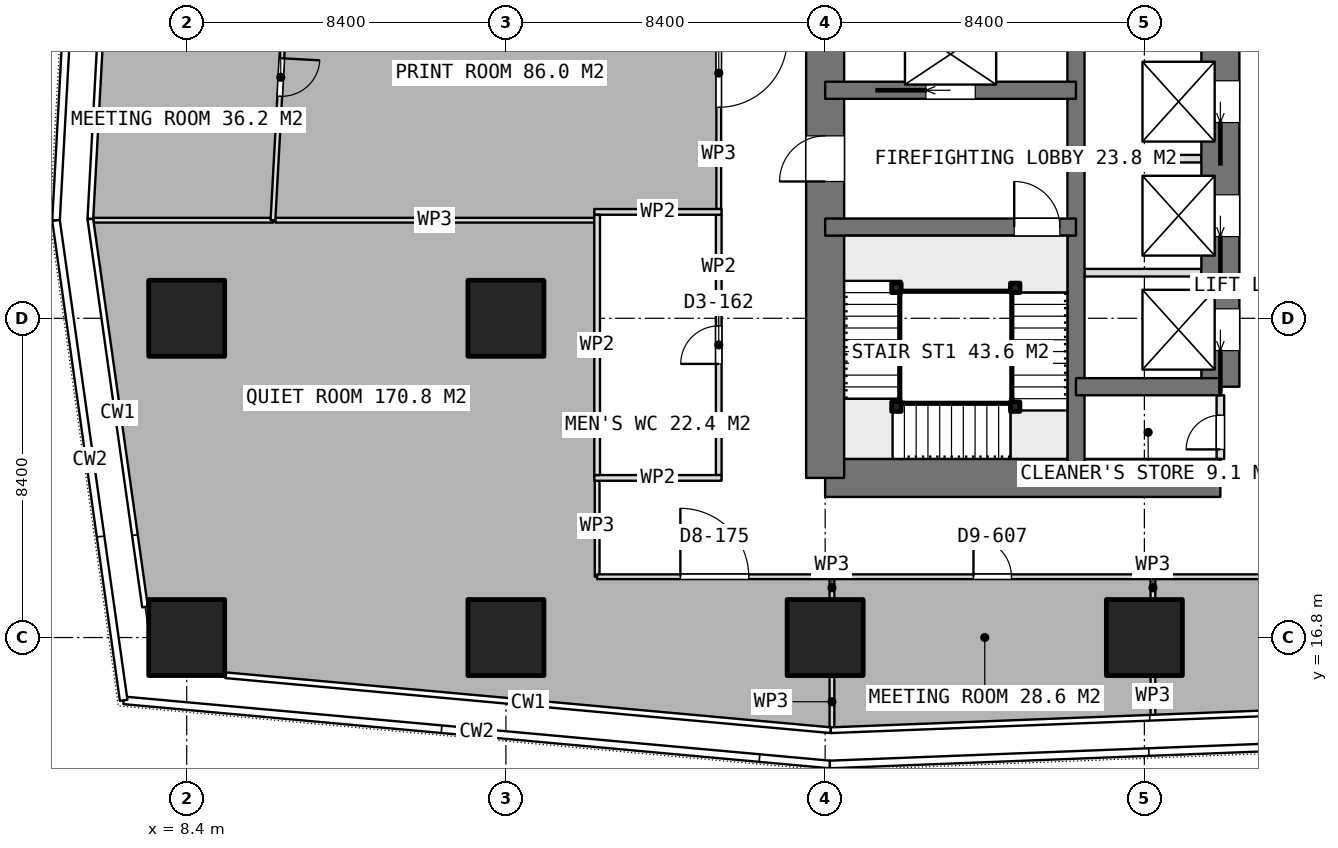
"""IFC4 building model, lengths in metres.
Left out: names, types, materials, properties, quantities, classifications, styles, units other than length and angle.
Written with IfcOpenShell. Run it as: python <this file> out.ifc"""

import sys

from ifc_helpers import new_model, si_unit, direction, frame, frame_2d, origin, origin_2d, place, context, subcontext, project, spatial, rectangle, extrude, element, fill, save


model = new_model("IFC4")
c1 = context("Model", 3, precision=1e-05, world=origin(), true_north=direction((0.0, 1.0)))
c2 = subcontext(c1, "Body", "Model", "MODEL_VIEW")
j1 = project(units=[si_unit("LENGTHUNIT", "METRE"), si_unit("PLANEANGLEUNIT", "RADIAN")], contexts=[c1])
p1 = place(None, origin())
s1 = spatial("IfcSite", under=j1, at=p1, CompositionType="ELEMENT")
p2 = place(p1, origin())
s2 = spatial("IfcBuilding", under=s1, at=p2, CompositionType="ELEMENT")
p3 = place(p2, frame((0.0, 0.0, 151.55)))
s3 = spatial("IfcBuildingStorey", under=s2, at=p3, CompositionType="ELEMENT", Elevation=151.55)
p4 = place(p3, frame((25.2, 21.0, 0.0), z_axis=(0.0, 0.0, 1.0), x_axis=(1.0, 0.0, 0.0)))
e1 = element("IfcWall", 1, at=p4, inside=s3, PredefinedType="SHEAR", context=c2, shape_type="SweptSolid", body=[
    extrude(rectangle(XDim=10.4, YDim=1.0, at=frame_2d((5.2, 0.0))), origin(), (0.0, 0.0, 1.0), 3.75),
])
p5 = place(p3, frame((25.2, 21.0, 0.0), z_axis=(0.0, 0.0, 1.0), x_axis=(0.0, 1.0, 0.0)))
e2 = element("IfcWall", 2, at=p5, inside=s3, PredefinedType="SHEAR", context=c2, shape_type="SweptSolid", body=[
    extrude(rectangle(XDim=25.2, YDim=1.0, at=frame_2d((12.6, 0.0))), origin(), (0.0, 0.0, 1.0), 3.75),
])
p6 = place(p5, frame((7.8, 0.0, 0.0)))
e3 = element("IfcOpeningElement", 3, at=p6, cuts=e2, PredefinedType="OPENING", context=c2, shape_type="SweptSolid", body=[
    extrude(rectangle(XDim=1.2, YDim=2.1, at=frame_2d((0.6, 1.05))), frame((0.0, 0.51, 0.0), z_axis=(0.0, -1.0, 0.0), x_axis=(1.0, 0.0, 0.0)), (0.0, 0.0, 1.0), 1.02),
])
p7 = place(p5, frame((14.25, 0.0, 0.0)))
e4 = element("IfcOpeningElement", 4, at=p7, cuts=e2, PredefinedType="OPENING", context=c2, shape_type="SweptSolid", body=[
    extrude(rectangle(XDim=0.9, YDim=2.1, at=frame_2d((0.45, 1.05))), frame((0.0, 0.51, 0.0), z_axis=(0.0, -1.0, 0.0), x_axis=(1.0, 0.0, 0.0)), (0.0, 0.0, 1.0), 1.02),
])
p8 = place(p5, frame((16.85, 0.0, 0.0)))
e5 = element("IfcOpeningElement", 5, at=p8, cuts=e2, PredefinedType="OPENING", context=c2, shape_type="SweptSolid", body=[
    extrude(rectangle(XDim=0.9, YDim=2.1, at=frame_2d((0.45, 1.05))), frame((0.0, 0.51, 0.0), z_axis=(0.0, -1.0, 0.0), x_axis=(1.0, 0.0, 0.0)), (0.0, 0.0, 1.0), 1.02),
])
p9 = place(p5, frame((19.025, 0.0, 0.0)))
e6 = element("IfcOpeningElement", 6, at=p9, cuts=e2, PredefinedType="OPENING", context=c2, shape_type="SweptSolid", body=[
    extrude(rectangle(XDim=1.2, YDim=2.1, at=frame_2d((0.6, 1.05))), frame((0.0, 0.51, 0.0), z_axis=(0.0, -1.0, 0.0), x_axis=(1.0, 0.0, 0.0)), (0.0, 0.0, 1.0), 1.02),
])
p10 = place(p3, frame((31.8, 21.0, 0.0), z_axis=(0.0, 0.0, 1.0), x_axis=(0.0, 1.0, 0.0)))
e7 = element("IfcWall", 7, at=p10, inside=s3, PredefinedType="SHEAR", context=c2, shape_type="SweptSolid", body=[
    extrude(rectangle(XDim=25.2, YDim=0.45, at=frame_2d((12.6, 0.0))), origin(), (0.0, 0.0, 1.0), 3.75),
])
p11 = place(p3, frame((35.6, 23.4, 0.0), z_axis=(0.0, 0.0, 1.0), x_axis=(0.0, 1.0, 0.0)))
e8 = element("IfcWall", 8, at=p11, inside=s3, PredefinedType="SHEAR", context=c2, shape_type="SweptSolid", body=[
    extrude(rectangle(XDim=18.0, YDim=1.0, at=frame_2d((9.0, 0.0))), origin(), (0.0, 0.0, 1.0), 3.75),
])
p12 = place(p11, frame((0.95, 0.0, 0.0)))
e9 = element("IfcOpeningElement", 9, at=p12, cuts=e8, PredefinedType="OPENING", context=c2, shape_type="SweptSolid", body=[
    extrude(rectangle(XDim=1.1, YDim=2.1, at=frame_2d((0.55, 1.05))), frame((0.0, 0.51, 0.0), z_axis=(0.0, -1.0, 0.0), x_axis=(1.0, 0.0, 0.0)), (0.0, 0.0, 1.0), 1.02),
])
p13 = place(p11, frame((3.95, 0.0, 0.0)))
e10 = element("IfcOpeningElement", 10, at=p13, cuts=e8, PredefinedType="OPENING", context=c2, shape_type="SweptSolid", body=[
    extrude(rectangle(XDim=1.1, YDim=2.1, at=frame_2d((0.55, 1.05))), frame((0.0, 0.51, 0.0), z_axis=(0.0, -1.0, 0.0), x_axis=(1.0, 0.0, 0.0)), (0.0, 0.0, 1.0), 1.02),
])
p14 = place(p11, frame((6.95, 0.0, 0.0)))
e11 = element("IfcOpeningElement", 11, at=p14, cuts=e8, PredefinedType="OPENING", context=c2, shape_type="SweptSolid", body=[
    extrude(rectangle(XDim=1.1, YDim=2.1, at=frame_2d((0.55, 1.05))), frame((0.0, 0.51, 0.0), z_axis=(0.0, -1.0, 0.0), x_axis=(1.0, 0.0, 0.0)), (0.0, 0.0, 1.0), 1.02),
])
p15 = place(p11, frame((9.95, 0.0, 0.0)))
e12 = element("IfcOpeningElement", 12, at=p15, cuts=e8, PredefinedType="OPENING", context=c2, shape_type="SweptSolid", body=[
    extrude(rectangle(XDim=1.1, YDim=2.1, at=frame_2d((0.55, 1.05))), frame((0.0, 0.51, 0.0), z_axis=(0.0, -1.0, 0.0), x_axis=(1.0, 0.0, 0.0)), (0.0, 0.0, 1.0), 1.02),
])
p16 = place(p11, frame((12.95, 0.0, 0.0)))
e13 = element("IfcOpeningElement", 13, at=p16, cuts=e8, PredefinedType="OPENING", context=c2, shape_type="SweptSolid", body=[
    extrude(rectangle(XDim=1.1, YDim=2.1, at=frame_2d((0.55, 1.05))), frame((0.0, 0.51, 0.0), z_axis=(0.0, -1.0, 0.0), x_axis=(1.0, 0.0, 0.0)), (0.0, 0.0, 1.0), 1.02),
])
p17 = place(p11, frame((15.95, 0.0, 0.0)))
e14 = element("IfcOpeningElement", 14, at=p17, cuts=e8, PredefinedType="OPENING", context=c2, shape_type="SweptSolid", body=[
    extrude(rectangle(XDim=1.1, YDim=2.1, at=frame_2d((0.55, 1.05))), frame((0.0, 0.51, 0.0), z_axis=(0.0, -1.0, 0.0), x_axis=(1.0, 0.0, 0.0)), (0.0, 0.0, 1.0), 1.02),
])
p18 = place(p3, frame((31.8, 23.4, 0.0), z_axis=(0.0, 0.0, 1.0), x_axis=(1.0, 0.0, 0.0)))
e15 = element("IfcWall", 15, at=p18, inside=s3, PredefinedType="SHEAR", context=c2, shape_type="SweptSolid", body=[
    extrude(rectangle(XDim=3.8, YDim=0.45, at=frame_2d((1.9, 0.0))), origin(), (0.0, 0.0, 1.0), 3.75),
])
p19 = place(p3, frame((25.2, 27.6, 0.0), z_axis=(0.0, 0.0, 1.0), x_axis=(1.0, 0.0, 0.0)))
e16 = element("IfcWall", 16, at=p19, inside=s3, PredefinedType="SHEAR", context=c2, shape_type="SweptSolid", body=[
    extrude(rectangle(XDim=6.6, YDim=0.45, at=frame_2d((3.3, 0.0))), origin(), (0.0, 0.0, 1.0), 3.75),
])
p20 = place(p19, frame((4.975, 0.0, 0.0)))
e17 = element("IfcOpeningElement", 17, at=p20, cuts=e16, PredefinedType="OPENING", context=c2, shape_type="SweptSolid", body=[
    extrude(rectangle(XDim=1.2, YDim=2.1, at=frame_2d((0.6, 1.05))), frame((0.0, 0.235, 0.0), z_axis=(0.0, -1.0, 0.0), x_axis=(1.0, 0.0, 0.0)), (0.0, 0.0, 1.0), 0.47),
])
p21 = place(p3, frame((25.2, 31.2, 0.0), z_axis=(0.0, 0.0, 1.0), x_axis=(1.0, 0.0, 0.0)))
e18 = element("IfcWall", 18, at=p21, inside=s3, PredefinedType="SHEAR", context=c2, shape_type="SweptSolid", body=[
    extrude(rectangle(XDim=6.6, YDim=0.45, at=frame_2d((3.3, 0.0))), origin(), (0.0, 0.0, 1.0), 3.75),
])
p22 = place(p21, frame((2.65, 0.0, 0.0)))
e19 = element("IfcOpeningElement", 19, at=p22, cuts=e18, PredefinedType="OPENING", context=c2, shape_type="SweptSolid", body=[
    extrude(rectangle(XDim=1.3, YDim=2.1, at=frame_2d((0.65, 1.05))), frame((0.0, 0.235, 0.0), z_axis=(0.0, -1.0, 0.0), x_axis=(1.0, 0.0, 0.0)), (0.0, 0.0, 1.0), 0.47),
])
for number, where, z_axis, x_axis in (
    (20, (8.4, 16.8, 0.0), (0.0, 0.0, 1.0), (1.0, 0.0, 0.0)),
    (21, (8.4, 25.2, 0.0), (0.0, 0.0, 1.0), (1.0, 0.0, 0.0)),
    (22, (16.8, 16.8, 0.0), (0.0, 0.0, 1.0), (1.0, 0.0, 0.0)),
    (23, (16.8, 25.2, 0.0), (0.0, 0.0, 1.0), (1.0, 0.0, 0.0)),
    (24, (25.2, 16.8, 0.0), (0.0, 0.0, 1.0), (1.0, 0.0, 0.0)),
    (25, (33.6, 16.8, 0.0), (0.0, 0.0, 1.0), (1.0, 0.0, 0.0)),
):
    element("IfcColumn", number, at=place(p3, frame(where, z_axis=z_axis, x_axis=x_axis)), inside=s3, PredefinedType="COLUMN", context=c2, shape_type="SweptSolid", body=[
        extrude(rectangle(XDim=2.0, YDim=2.0, at=origin_2d()), origin(), (0.0, 0.0, 1.0), 3.75),
    ])
for number, where, z_axis, x_axis in (
    (26, (32.025, 26.4, 0.0), (0.0, 0.0, 1.0), (1.0, 0.0, 0.0)),
    (27, (32.025, 29.4, 0.0), (0.0, 0.0, 1.0), (1.0, 0.0, 0.0)),
):
    element("IfcWall", number, at=place(p3, frame(where, z_axis=z_axis, x_axis=x_axis)), inside=s3, PredefinedType="PARTITIONING", context=c2, shape_type="SweptSolid", body=[
        extrude(rectangle(XDim=3.075, YDim=0.2, at=frame_2d((1.538, 0.0))), origin(), (0.0, 0.0, 1.0), 3.5),
    ])
p23 = place(p3, frame((35.6, 21.5, 0.0), z_axis=(0.0, 0.0, 1.0), x_axis=(0.0, 1.0, 0.0)))
e28 = element("IfcWall", 28, at=p23, inside=s3, PredefinedType="PARTITIONING", context=c2, shape_type="SweptSolid", body=[
    extrude(rectangle(XDim=1.675, YDim=0.2, at=frame_2d((0.837, 0.0))), origin(), (0.0, 0.0, 1.0), 3.5),
])
p24 = place(p23, frame((0.25, 0.0, 0.0)))
e29 = element("IfcOpeningElement", 29, at=p24, cuts=e28, PredefinedType="OPENING", context=c2, shape_type="SweptSolid", body=[
    extrude(rectangle(XDim=0.9, YDim=2.1, at=frame_2d((0.45, 1.05))), frame((0.0, 0.11, 0.0), z_axis=(0.0, -1.0, 0.0), x_axis=(1.0, 0.0, 0.0)), (0.0, 0.0, 1.0), 0.22),
])
for number, where, z_axis, x_axis in (
    (30, (19.125, 21.0, 0.0), (0.0, 0.0, 1.0), (1.0, 0.0, 0.0)),
    (31, (19.125, 28.0, 0.0), (0.0, 0.0, 1.0), (1.0, 0.0, 0.0)),
):
    element("IfcWall", number, at=place(p3, frame(where, z_axis=z_axis, x_axis=x_axis)), inside=s3, PredefinedType="PARTITIONING", context=c2, shape_type="SweptSolid", body=[
        extrude(rectangle(XDim=3.35, YDim=0.15, at=frame_2d((1.675, 0.0))), origin(), (0.0, 0.0, 1.0), 3.5),
    ])
p25 = place(p3, frame((19.2, 21.075, 0.0), z_axis=(0.0, 0.0, 1.0), x_axis=(0.0, 1.0, 0.0)))
e32 = element("IfcWall", 32, at=p25, inside=s3, PredefinedType="PARTITIONING", context=c2, shape_type="SweptSolid", body=[
    extrude(rectangle(XDim=6.85, YDim=0.15, at=frame_2d((3.425, 0.0))), origin(), (0.0, 0.0, 1.0), 3.5),
])
p26 = place(p3, frame((22.4, 21.075, 0.0), z_axis=(0.0, 0.0, 1.0), x_axis=(0.0, 1.0, 0.0)))
e33 = element("IfcWall", 33, at=p26, inside=s3, PredefinedType="PARTITIONING", context=c2, shape_type="SweptSolid", body=[
    extrude(rectangle(XDim=6.85, YDim=0.15, at=frame_2d((3.425, 0.0))), origin(), (0.0, 0.0, 1.0), 3.5),
])
p27 = place(p26, frame((2.925, 0.0, 0.0)))
e34 = element("IfcOpeningElement", 34, at=p27, cuts=e33, PredefinedType="OPENING", context=c2, shape_type="SweptSolid", body=[
    extrude(rectangle(XDim=1.0, YDim=2.1, at=frame_2d((0.5, 1.05))), frame((0.0, 0.085, 0.0), z_axis=(0.0, -1.0, 0.0), x_axis=(1.0, 0.0, 0.0)), (0.0, 0.0, 1.0), 0.17),
])
p28 = place(p3, frame((5.949, 27.781, 0.0), z_axis=(0.0, 0.0, 1.0), x_axis=(1.0, 0.0, 0.0)))
e35 = element("IfcWall", 35, at=p28, inside=s3, PredefinedType="PARTITIONING", context=c2, shape_type="SweptSolid", body=[
    extrude(rectangle(XDim=4.72, YDim=0.125, at=frame_2d((2.36, 0.0))), origin(), (0.0, 0.0, 1.0), 3.5),
])
p29 = place(p3, frame((25.379, 18.4, 0.0), z_axis=(0.0, 0.0, 1.0), x_axis=(0.0, -1.0, 0.0)))
e36 = element("IfcWall", 36, at=p29, inside=s3, PredefinedType="PARTITIONING", context=c2, shape_type="SweptSolid", body=[
    extrude(rectangle(XDim=0.58, YDim=0.125, at=frame_2d((0.29, 0.0))), origin(), (0.0, 0.0, 1.0), 3.5),
])
p30 = place(p3, frame((25.379, 15.78, 0.0), z_axis=(0.0, 0.0, 1.0), x_axis=(0.0, -1.0, 0.0)))
e37 = element("IfcWall", 37, at=p30, inside=s3, PredefinedType="PARTITIONING", context=c2, shape_type="SweptSolid", body=[
    extrude(rectangle(XDim=1.337, YDim=0.125, at=frame_2d((0.668, 0.0))), origin(), (0.0, 0.0, 1.0), 3.5),
])
p31 = place(p3, frame((10.732, 27.781, 0.0), z_axis=(0.0, 0.0, 1.0), x_axis=(1.0, 0.0, 0.0)))
e38 = element("IfcWall", 38, at=p31, inside=s3, PredefinedType="PARTITIONING", context=c2, shape_type="SweptSolid", body=[
    extrude(rectangle(XDim=8.393, YDim=0.125, at=frame_2d((4.197, 0.0))), origin(), (0.0, 0.0, 1.0), 3.5),
])
p32 = place(p3, frame((19.2, 21.075, 0.0), z_axis=(0.0, 0.0, 1.0), x_axis=(0.0, -1.0, 0.0)))
e39 = element("IfcWall", 39, at=p32, inside=s3, PredefinedType="PARTITIONING", context=c2, shape_type="SweptSolid", body=[
    extrude(rectangle(XDim=2.675, YDim=0.125, at=frame_2d((1.337, 0.0))), origin(), (0.0, 0.0, 1.0), 3.5),
])
p33 = place(p3, frame((19.2, 18.4, 0.0), z_axis=(0.0, 0.0, 1.0), x_axis=(1.0, 0.0, 0.0)))
e40 = element("IfcWall", 40, at=p33, inside=s3, PredefinedType="PARTITIONING", context=c2, shape_type="SweptSolid", body=[
    extrude(rectangle(XDim=6.179, YDim=0.125, at=frame_2d((3.089, 0.0))), origin(), (0.0, 0.0, 1.0), 3.5),
])
p34 = place(p33, frame((2.19, 0.0, 0.0)))
e41 = element("IfcOpeningElement", 41, at=p34, cuts=e40, PredefinedType="OPENING", context=c2, shape_type="SweptSolid", body=[
    extrude(rectangle(XDim=1.8, YDim=2.1, at=frame_2d((0.9, 1.05))), frame((0.0, 0.073, 0.0), z_axis=(0.0, -1.0, 0.0), x_axis=(1.0, 0.0, 0.0)), (0.0, 0.0, 1.0), 0.145),
])
p35 = place(p3, frame((25.38, 18.4, 0.0), z_axis=(0.0, 0.0, 1.0), x_axis=(1.0, 0.0, 0.0)))
e42 = element("IfcWall", 42, at=p35, inside=s3, PredefinedType="PARTITIONING", context=c2, shape_type="SweptSolid", body=[
    extrude(rectangle(XDim=8.445, YDim=0.125, at=frame_2d((4.223, 0.0))), origin(), (0.0, 0.0, 1.0), 3.5),
])
p36 = place(p35, frame((3.723, 0.0, 0.0)))
e43 = element("IfcOpeningElement", 43, at=p36, cuts=e42, PredefinedType="OPENING", context=c2, shape_type="SweptSolid", body=[
    extrude(rectangle(XDim=1.0, YDim=2.1, at=frame_2d((0.5, 1.05))), frame((0.0, 0.073, 0.0), z_axis=(0.0, -1.0, 0.0), x_axis=(1.0, 0.0, 0.0)), (0.0, 0.0, 1.0), 0.145),
])
p37 = place(p3, frame((33.825, 18.4, 0.0), z_axis=(0.0, 0.0, 1.0), x_axis=(0.0, -1.0, 0.0)))
e44 = element("IfcWall", 44, at=p37, inside=s3, PredefinedType="PARTITIONING", context=c2, shape_type="SweptSolid", body=[
    extrude(rectangle(XDim=0.58, YDim=0.125, at=frame_2d((0.29, 0.0))), origin(), (0.0, 0.0, 1.0), 3.5),
])
p38 = place(p3, frame((33.825, 15.78, 0.0), z_axis=(0.0, 0.0, 1.0), x_axis=(0.0, -1.0, 0.0)))
e45 = element("IfcWall", 45, at=p38, inside=s3, PredefinedType="PARTITIONING", context=c2, shape_type="SweptSolid", body=[
    extrude(rectangle(XDim=1.038, YDim=0.125, at=frame_2d((0.519, 0.0))), origin(), (0.0, 0.0, 1.0), 3.5),
])
p39 = place(p3, frame((33.826, 18.4, 0.0), z_axis=(0.0, 0.0, 1.0), x_axis=(1.0, 0.0, 0.0)))
e46 = element("IfcWall", 46, at=p39, inside=s3, PredefinedType="PARTITIONING", context=c2, shape_type="SweptSolid", body=[
    extrude(rectangle(XDim=15.353, YDim=0.125, at=frame_2d((7.677, 0.0))), origin(), (0.0, 0.0, 1.0), 3.5),
])
p40 = place(p39, frame((6.077, 0.0, 0.0)))
e47 = element("IfcOpeningElement", 47, at=p40, cuts=e46, PredefinedType="OPENING", context=c2, shape_type="SweptSolid", body=[
    extrude(rectangle(XDim=1.0, YDim=2.1, at=frame_2d((0.5, 1.05))), frame((0.0, 0.073, 0.0), z_axis=(0.0, -1.0, 0.0), x_axis=(1.0, 0.0, 0.0)), (0.0, 0.0, 1.0), 0.145),
])
p41 = place(p3, frame((11.078, 35.229, 0.0), z_axis=(0.0, 0.0, 1.0), x_axis=(-0.054822859053, -0.998496096199, 0.0)))
e48 = element("IfcWall", 48, at=p41, inside=s3, PredefinedType="PARTITIONING", context=c2, shape_type="SweptSolid", body=[
    extrude(rectangle(XDim=7.459, YDim=0.125, at=frame_2d((3.729, 0.0))), origin(), (0.0, 0.0, 1.0), 3.5),
])
p42 = place(p41, frame((3.192, 0.0, 0.0)))
e49 = element("IfcOpeningElement", 49, at=p42, cuts=e48, PredefinedType="OPENING", context=c2, shape_type="SweptSolid", body=[
    extrude(rectangle(XDim=1.0, YDim=2.1, at=frame_2d((0.5, 1.05))), frame((0.0, 0.073, 0.0), z_axis=(0.0, -1.0, 0.0), x_axis=(1.0, 0.0, 0.0)), (0.0, 0.0, 1.0), 0.145),
])
p43 = place(p3, frame((22.4, 35.304, 0.0), z_axis=(0.0, 0.0, 1.0), x_axis=(0.0, -1.0, 0.0)))
e50 = element("IfcWall", 50, at=p43, inside=s3, PredefinedType="PARTITIONING", context=c2, shape_type="SweptSolid", body=[
    extrude(rectangle(XDim=7.229, YDim=0.125, at=frame_2d((3.615, 0.0))), origin(), (0.0, 0.0, 1.0), 3.5),
])
p44 = place(p43, frame((2.752, 0.0, 0.0)))
e51 = element("IfcOpeningElement", 51, at=p44, cuts=e50, PredefinedType="OPENING", context=c2, shape_type="SweptSolid", body=[
    extrude(rectangle(XDim=1.8, YDim=2.1, at=frame_2d((0.9, 1.05))), frame((0.0, 0.073, 0.0), z_axis=(0.0, -1.0, 0.0), x_axis=(1.0, 0.0, 0.0)), (0.0, 0.0, 1.0), 0.145),
])
for number, where, z_axis, x_axis in (
    (52, (30.2, 26.0, 0.0), (0.0, 0.0, 1.0), (1.0, 0.0, 0.0)),
    (53, (30.2, 22.875, 0.0), (0.0, 0.0, 1.0), (1.0, 0.0, 0.0)),
    (54, (27.075, 22.875, 0.0), (0.0, 0.0, 1.0), (1.0, 0.0, 0.0)),
    (55, (27.075, 26.0, 0.0), (0.0, 0.0, 1.0), (1.0, 0.0, 0.0)),
):
    element("IfcColumn", number, at=place(p3, frame(where, z_axis=z_axis, x_axis=x_axis)), inside=s3, PredefinedType="COLUMN", context=c2, shape_type="SweptSolid", body=[
        extrude(rectangle(XDim=0.25, YDim=0.25, at=origin_2d()), origin(), (0.0, 0.0, 1.0), 3.75),
    ])
p45 = place(p6, origin())
e56 = element("IfcDoor", 56, at=p45, inside=s3, OperationType="SINGLE_SWING_LEFT", PredefinedType="DOOR", context=c2, shape_type="SweptSolid", body=[
    extrude(rectangle(XDim=1.2, YDim=2.1, at=frame_2d((0.6, 1.05))), frame((0.0, 0.025, 0.0), z_axis=(0.0, -1.0, 0.0), x_axis=(1.0, 0.0, 0.0)), (0.0, 0.0, 1.0), 0.05),
])
fill(e3, e56)
p46 = place(p24, origin())
e57 = element("IfcDoor", 57, at=p46, inside=s3, OperationType="SINGLE_SWING_LEFT", PredefinedType="DOOR", context=c2, shape_type="SweptSolid", body=[
    extrude(rectangle(XDim=0.9, YDim=2.1, at=frame_2d((0.45, 1.05))), frame((0.0, 0.025, 0.0), z_axis=(0.0, -1.0, 0.0), x_axis=(1.0, 0.0, 0.0)), (0.0, 0.0, 1.0), 0.05),
])
fill(e29, e57)
p47 = place(p12, origin())
e58 = element("IfcDoor", 58, at=p47, inside=s3, OperationType="SLIDING_TO_LEFT", PredefinedType="USERDEFINED", context=c2, shape_type="SweptSolid", body=[
    extrude(rectangle(XDim=1.1, YDim=2.1, at=frame_2d((0.55, 1.05))), frame((0.0, 0.025, 0.0), z_axis=(0.0, -1.0, 0.0), x_axis=(1.0, 0.0, 0.0)), (0.0, 0.0, 1.0), 0.05),
])
fill(e9, e58)
p48 = place(p13, origin())
e59 = element("IfcDoor", 59, at=p48, inside=s3, OperationType="SLIDING_TO_LEFT", PredefinedType="USERDEFINED", context=c2, shape_type="SweptSolid", body=[
    extrude(rectangle(XDim=1.1, YDim=2.1, at=frame_2d((0.55, 1.05))), frame((0.0, 0.025, 0.0), z_axis=(0.0, -1.0, 0.0), x_axis=(1.0, 0.0, 0.0)), (0.0, 0.0, 1.0), 0.05),
])
fill(e10, e59)
p49 = place(p14, origin())
e60 = element("IfcDoor", 60, at=p49, inside=s3, OperationType="SLIDING_TO_LEFT", PredefinedType="USERDEFINED", context=c2, shape_type="SweptSolid", body=[
    extrude(rectangle(XDim=1.1, YDim=2.1, at=frame_2d((0.55, 1.05))), frame((0.0, 0.025, 0.0), z_axis=(0.0, -1.0, 0.0), x_axis=(1.0, 0.0, 0.0)), (0.0, 0.0, 1.0), 0.05),
])
fill(e11, e60)
p50 = place(p22, origin())
e61 = element("IfcDoor", 61, at=p50, inside=s3, OperationType="SLIDING_TO_LEFT", PredefinedType="USERDEFINED", context=c2, shape_type="SweptSolid", body=[
    extrude(rectangle(XDim=1.3, YDim=2.1, at=frame_2d((0.65, 1.05))), frame((0.0, 0.025, 0.0), z_axis=(0.0, -1.0, 0.0), x_axis=(1.0, 0.0, 0.0)), (0.0, 0.0, 1.0), 0.05),
])
fill(e19, e61)
p51 = place(p27, origin())
e62 = element("IfcDoor", 62, at=p51, inside=s3, OperationType="SINGLE_SWING_LEFT", PredefinedType="DOOR", context=c2, shape_type="SweptSolid", body=[
    extrude(rectangle(XDim=1.0, YDim=2.1, at=frame_2d((0.5, 1.05))), frame((0.0, 0.025, 0.0), z_axis=(0.0, -1.0, 0.0), x_axis=(1.0, 0.0, 0.0)), (0.0, 0.0, 1.0), 0.05),
])
fill(e34, e62)
p52 = place(p34, origin())
e63 = element("IfcDoor", 63, at=p52, inside=s3, OperationType="DOUBLE_DOOR_SINGLE_SWING", PredefinedType="DOOR", context=c2, shape_type="SweptSolid", body=[
    extrude(rectangle(XDim=1.8, YDim=2.1, at=frame_2d((0.9, 1.05))), frame((0.0, 0.025, 0.0), z_axis=(0.0, -1.0, 0.0), x_axis=(1.0, 0.0, 0.0)), (0.0, 0.0, 1.0), 0.05),
])
fill(e41, e63)
p53 = place(p36, origin())
e64 = element("IfcDoor", 64, at=p53, inside=s3, OperationType="SINGLE_SWING_LEFT", PredefinedType="DOOR", context=c2, shape_type="SweptSolid", body=[
    extrude(rectangle(XDim=1.0, YDim=2.1, at=frame_2d((0.5, 1.05))), frame((0.0, 0.025, 0.0), z_axis=(0.0, -1.0, 0.0), x_axis=(1.0, 0.0, 0.0)), (0.0, 0.0, 1.0), 0.05),
])
fill(e43, e64)
p54 = place(p44, origin())
e65 = element("IfcDoor", 65, at=p54, inside=s3, OperationType="DOUBLE_DOOR_SINGLE_SWING", PredefinedType="DOOR", context=c2, shape_type="SweptSolid", body=[
    extrude(rectangle(XDim=1.8, YDim=2.1, at=frame_2d((0.9, 1.05))), frame((0.0, 0.025, 0.0), z_axis=(0.0, -1.0, 0.0), x_axis=(1.0, 0.0, 0.0)), (0.0, 0.0, 1.0), 0.05),
])
fill(e51, e65)
p55 = place(p42, origin())
e66 = element("IfcDoor", 66, at=p55, inside=s3, OperationType="SINGLE_SWING_LEFT", PredefinedType="DOOR", context=c2, shape_type="SweptSolid", body=[
    extrude(rectangle(XDim=1.0, YDim=2.1, at=frame_2d((0.5, 1.05))), frame((0.0, 0.025, 0.0), z_axis=(0.0, -1.0, 0.0), x_axis=(1.0, 0.0, 0.0)), (0.0, 0.0, 1.0), 0.05),
])
fill(e49, e66)
p56 = place(p20, origin())
e67 = element("IfcDoor", 67, at=p56, inside=s3, OperationType="SINGLE_SWING_RIGHT", PredefinedType="DOOR", context=c2, shape_type="SweptSolid", body=[
    extrude(rectangle(XDim=1.2, YDim=2.1, at=frame_2d((0.6, 1.05))), frame((0.0, 0.025, 0.0), z_axis=(0.0, -1.0, 0.0), x_axis=(1.0, 0.0, 0.0)), (0.0, 0.0, 1.0), 0.05),
])
fill(e17, e67)
save(model, sys.argv[1])
